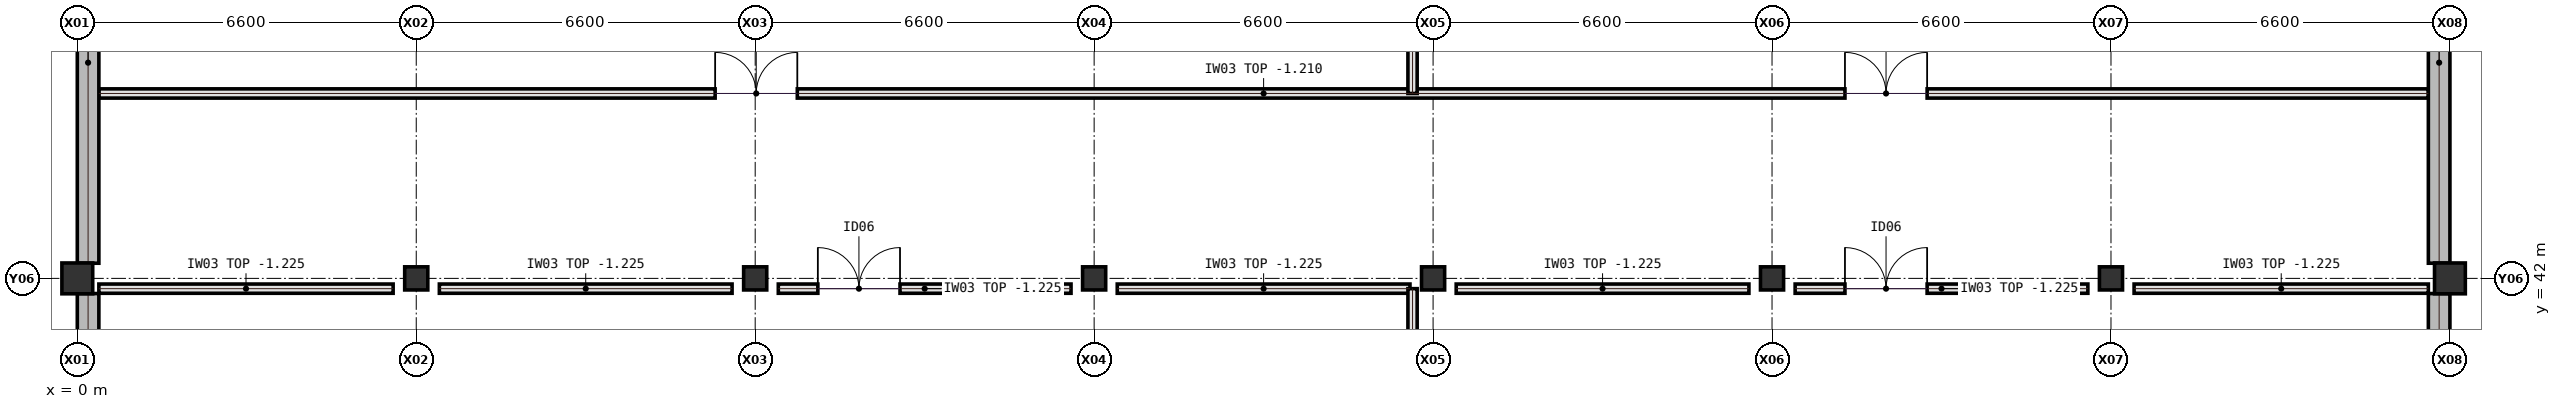
"""IFC4 building model, lengths in metres.
Left out: names, types, materials, properties, quantities, classifications, styles, units other than length and angle.
Written with IfcOpenShell. Run it as: python <this file> out.ifc"""

import sys

from ifc_helpers import new_model, si_unit, direction, frame, frame_2d, origin, origin_2d, place, context, subcontext, project, spatial, rectangle, extrude, element, fill, save


model = new_model("IFC4")
c1 = context("Model", 3, precision=1e-05, world=origin(), true_north=direction((0.0, 1.0)))
c2 = subcontext(c1, "Body", "Model", "MODEL_VIEW")
j1 = project(units=[si_unit("LENGTHUNIT", "METRE"), si_unit("PLANEANGLEUNIT", "RADIAN")], contexts=[c1])
p1 = place(None, origin())
s1 = spatial("IfcSite", under=j1, at=p1, CompositionType="ELEMENT")
p2 = place(p1, origin())
s2 = spatial("IfcBuilding", under=s1, at=p2, CompositionType="ELEMENT")
p3 = place(p2, frame((0.0, 0.0, -4.5)))
s3 = spatial("IfcBuildingStorey", under=s2, at=p3, CompositionType="ELEMENT", Elevation=-4.5)
p4 = place(p3, frame((0.0, 42.0, 0.0), z_axis=(0.0, 0.0, 1.0), x_axis=(1.0, 0.0, 0.0)))
e1 = element("IfcColumn", 1, at=p4, inside=s3, PredefinedType="COLUMN", context=c2, shape_type="SweptSolid", body=[
    extrude(rectangle(XDim=0.6, YDim=0.6, at=origin_2d()), origin(), (0.0, 0.0, 1.0), 4.5),
])
for number, where, z_axis, x_axis in (
    (2, (6.6, 42.0, 0.0), (0.0, 0.0, 1.0), (1.0, 0.0, 0.0)),
    (3, (13.2, 42.0, 0.0), (0.0, 0.0, 1.0), (1.0, 0.0, 0.0)),
    (4, (19.8, 42.0, 0.0), (0.0, 0.0, 1.0), (1.0, 0.0, 0.0)),
    (5, (26.4, 42.0, 0.0), (0.0, 0.0, 1.0), (1.0, 0.0, 0.0)),
    (6, (33.0, 42.0, 0.0), (0.0, 0.0, 1.0), (1.0, 0.0, 0.0)),
    (7, (39.6, 42.0, 0.0), (0.0, 0.0, 1.0), (1.0, 0.0, 0.0)),
):
    element("IfcColumn", number, at=place(p3, frame(where, z_axis=z_axis, x_axis=x_axis)), inside=s3, PredefinedType="COLUMN", context=c2, shape_type="SweptSolid", body=[
        extrude(rectangle(XDim=0.45, YDim=0.45, at=origin_2d()), origin(), (0.0, 0.0, 1.0), 4.5),
    ])
p5 = place(p3, frame((46.2, 42.0, 0.0), z_axis=(0.0, 0.0, 1.0), x_axis=(1.0, 0.0, 0.0)))
e8 = element("IfcColumn", 8, at=p5, inside=s3, PredefinedType="COLUMN", context=c2, shape_type="SweptSolid", body=[
    extrude(rectangle(XDim=0.6, YDim=0.6, at=origin_2d()), origin(), (0.0, 0.0, 1.0), 4.5),
])
p6 = place(p3, frame((0.42, 41.8, 0.0), z_axis=(0.0, 0.0, 1.0), x_axis=(1.0, 0.0, 0.0)))
e9 = element("IfcWall", 9, at=p6, inside=s3, PredefinedType="SOLIDWALL", context=c2, shape_type="SweptSolid", body=[
    extrude(rectangle(XDim=5.73, YDim=0.18, at=frame_2d((2.865, 0.0))), origin(), (0.0, 0.0, 1.0), 3.275),
])
p7 = place(p3, frame((7.05, 41.8, 0.0), z_axis=(0.0, 0.0, 1.0), x_axis=(1.0, 0.0, 0.0)))
e10 = element("IfcWall", 10, at=p7, inside=s3, PredefinedType="SOLIDWALL", context=c2, shape_type="SweptSolid", body=[
    extrude(rectangle(XDim=5.7, YDim=0.18, at=frame_2d((2.85, 0.0))), origin(), (0.0, 0.0, 1.0), 3.275),
])
p8 = place(p3, frame((13.65, 41.8, 0.0), z_axis=(0.0, 0.0, 1.0), x_axis=(1.0, 0.0, 0.0)))
e11 = element("IfcWall", 11, at=p8, inside=s3, PredefinedType="SOLIDWALL", context=c2, shape_type="SweptSolid", body=[
    extrude(rectangle(XDim=5.7, YDim=0.18, at=frame_2d((2.85, 0.0))), origin(), (0.0, 0.0, 1.0), 3.275),
])
p9 = place(p8, frame((0.77, 0.0, 0.0)))
e12 = element("IfcOpeningElement", 12, at=p9, cuts=e11, PredefinedType="OPENING", context=c2, shape_type="SweptSolid", body=[
    extrude(rectangle(XDim=1.6, YDim=2.2, at=frame_2d((0.8, 1.1))), frame((0.0, 0.1, 0.0), z_axis=(0.0, -1.0, 0.0), x_axis=(1.0, 0.0, 0.0)), (0.0, 0.0, 1.0), 0.2),
])
for number, where, z_axis, x_axis in (
    (13, (20.25, 41.8, 0.0), (0.0, 0.0, 1.0), (1.0, 0.0, 0.0)),
    (14, (26.85, 41.8, 0.0), (0.0, 0.0, 1.0), (1.0, 0.0, 0.0)),
):
    element("IfcWall", number, at=place(p3, frame(where, z_axis=z_axis, x_axis=x_axis)), inside=s3, PredefinedType="SOLIDWALL", context=c2, shape_type="SweptSolid", body=[
        extrude(rectangle(XDim=5.7, YDim=0.18, at=frame_2d((2.85, 0.0))), origin(), (0.0, 0.0, 1.0), 3.275),
    ])
p10 = place(p3, frame((33.45, 41.8, 0.0), z_axis=(0.0, 0.0, 1.0), x_axis=(1.0, 0.0, 0.0)))
e15 = element("IfcWall", 15, at=p10, inside=s3, PredefinedType="SOLIDWALL", context=c2, shape_type="SweptSolid", body=[
    extrude(rectangle(XDim=5.7, YDim=0.18, at=frame_2d((2.85, 0.0))), origin(), (0.0, 0.0, 1.0), 3.275),
])
p11 = place(p10, frame((0.97, 0.0, 0.0)))
e16 = element("IfcOpeningElement", 16, at=p11, cuts=e15, PredefinedType="OPENING", context=c2, shape_type="SweptSolid", body=[
    extrude(rectangle(XDim=1.6, YDim=2.2, at=frame_2d((0.8, 1.1))), frame((0.0, 0.1, 0.0), z_axis=(0.0, -1.0, 0.0), x_axis=(1.0, 0.0, 0.0)), (0.0, 0.0, 1.0), 0.2),
])
p12 = place(p3, frame((40.05, 41.8, 0.0), z_axis=(0.0, 0.0, 1.0), x_axis=(1.0, 0.0, 0.0)))
e17 = element("IfcWall", 17, at=p12, inside=s3, PredefinedType="SOLIDWALL", context=c2, shape_type="SweptSolid", body=[
    extrude(rectangle(XDim=5.73, YDim=0.18, at=frame_2d((2.865, 0.0))), origin(), (0.0, 0.0, 1.0), 3.275),
])
p13 = place(p3, frame((26.0, 34.05, 0.0), z_axis=(0.0, 0.0, 1.0), x_axis=(0.0, 1.0, 0.0)))
e18 = element("IfcWall", 18, at=p13, inside=s3, PredefinedType="SOLIDWALL", context=c2, shape_type="SweptSolid", body=[
    extrude(rectangle(XDim=7.75, YDim=0.18, at=frame_2d((3.875, 0.0))), origin(), (0.0, 0.0, 1.0), 3.29),
])
p14 = place(p3, frame((0.42, 45.6, 0.0), z_axis=(0.0, 0.0, 1.0), x_axis=(1.0, 0.0, 0.0)))
e19 = element("IfcWall", 19, at=p14, inside=s3, PredefinedType="SOLIDWALL", context=c2, shape_type="SweptSolid", body=[
    extrude(rectangle(XDim=45.36, YDim=0.18, at=frame_2d((22.68, 0.0))), origin(), (0.0, 0.0, 1.0), 3.29),
])
p15 = place(p14, frame((12.0, 0.0, 0.0)))
e20 = element("IfcOpeningElement", 20, at=p15, cuts=e19, PredefinedType="OPENING", context=c2, shape_type="SweptSolid", body=[
    extrude(rectangle(XDim=1.6, YDim=2.2, at=frame_2d((0.8, 1.1))), frame((0.0, 0.1, 0.0), z_axis=(0.0, -1.0, 0.0), x_axis=(1.0, 0.0, 0.0)), (0.0, 0.0, 1.0), 0.2),
])
p16 = place(p14, frame((34.0, 0.0, 0.0)))
e21 = element("IfcOpeningElement", 21, at=p16, cuts=e19, PredefinedType="OPENING", context=c2, shape_type="SweptSolid", body=[
    extrude(rectangle(XDim=1.6, YDim=2.2, at=frame_2d((0.8, 1.1))), frame((0.0, 0.1, 0.0), z_axis=(0.0, -1.0, 0.0), x_axis=(1.0, 0.0, 0.0)), (0.0, 0.0, 1.0), 0.2),
])
p17 = place(p3, frame((26.0, 45.6, 0.0), z_axis=(0.0, 0.0, 1.0), x_axis=(0.0, 1.0, 0.0)))
e22 = element("IfcWall", 22, at=p17, inside=s3, PredefinedType="SOLIDWALL", context=c2, shape_type="SweptSolid", body=[
    extrude(rectangle(XDim=4.35, YDim=0.18, at=frame_2d((2.175, 0.0))), origin(), (0.0, 0.0, 1.0), 3.29),
])
for number, where, z_axis, x_axis in (
    (23, (0.21, 41.705, 0.0), (0.0, 0.0, 1.0), (0.0, -1.0, 0.0)),
    (24, (0.21, 50.105, 0.0), (0.0, 0.0, 1.0), (0.0, -1.0, 0.0)),
    (25, (45.99, 33.895, 0.0), (0.0, 0.0, 1.0), (0.0, 1.0, 0.0)),
    (26, (45.99, 42.295, 0.0), (0.0, 0.0, 1.0), (0.0, 1.0, 0.0)),
):
    element("IfcWall", number, at=place(p3, frame(where, z_axis=z_axis, x_axis=x_axis)), inside=s3, PredefinedType="SOLIDWALL", context=c2, shape_type="SweptSolid", body=[
        extrude(rectangle(XDim=7.81, YDim=0.42, at=frame_2d((3.905, 0.0))), origin(), (0.0, 0.0, 1.0), 4.14),
    ])
p18 = place(p9, origin())
e27 = element("IfcDoor", 27, at=p18, inside=s3, OperationType="DOUBLE_DOOR_SINGLE_SWING", PredefinedType="DOOR", context=c2, shape_type="SweptSolid", body=[
    extrude(rectangle(XDim=1.6, YDim=2.2, at=frame_2d((0.8, 1.1))), frame((0.0, 0.025, 0.0), z_axis=(0.0, -1.0, 0.0), x_axis=(1.0, 0.0, 0.0)), (0.0, 0.0, 1.0), 0.05),
])
fill(e12, e27)
p19 = place(p11, origin())
e28 = element("IfcDoor", 28, at=p19, inside=s3, OperationType="DOUBLE_DOOR_SINGLE_SWING", PredefinedType="DOOR", context=c2, shape_type="SweptSolid", body=[
    extrude(rectangle(XDim=1.6, YDim=2.2, at=frame_2d((0.8, 1.1))), frame((0.0, 0.025, 0.0), z_axis=(0.0, -1.0, 0.0), x_axis=(1.0, 0.0, 0.0)), (0.0, 0.0, 1.0), 0.05),
])
fill(e16, e28)
p20 = place(p15, origin())
e29 = element("IfcDoor", 29, at=p20, inside=s3, OperationType="DOUBLE_DOOR_SINGLE_SWING", PredefinedType="DOOR", context=c2, shape_type="SweptSolid", body=[
    extrude(rectangle(XDim=1.6, YDim=2.2, at=frame_2d((0.8, 1.1))), frame((0.0, 0.025, 0.0), z_axis=(0.0, -1.0, 0.0), x_axis=(1.0, 0.0, 0.0)), (0.0, 0.0, 1.0), 0.05),
])
fill(e20, e29)
p21 = place(p16, origin())
e30 = element("IfcDoor", 30, at=p21, inside=s3, OperationType="DOUBLE_DOOR_SINGLE_SWING", PredefinedType="DOOR", context=c2, shape_type="SweptSolid", body=[
    extrude(rectangle(XDim=1.6, YDim=2.2, at=frame_2d((0.8, 1.1))), frame((0.0, 0.025, 0.0), z_axis=(0.0, -1.0, 0.0), x_axis=(1.0, 0.0, 0.0)), (0.0, 0.0, 1.0), 0.05),
])
fill(e21, e30)
save(model, sys.argv[1])
